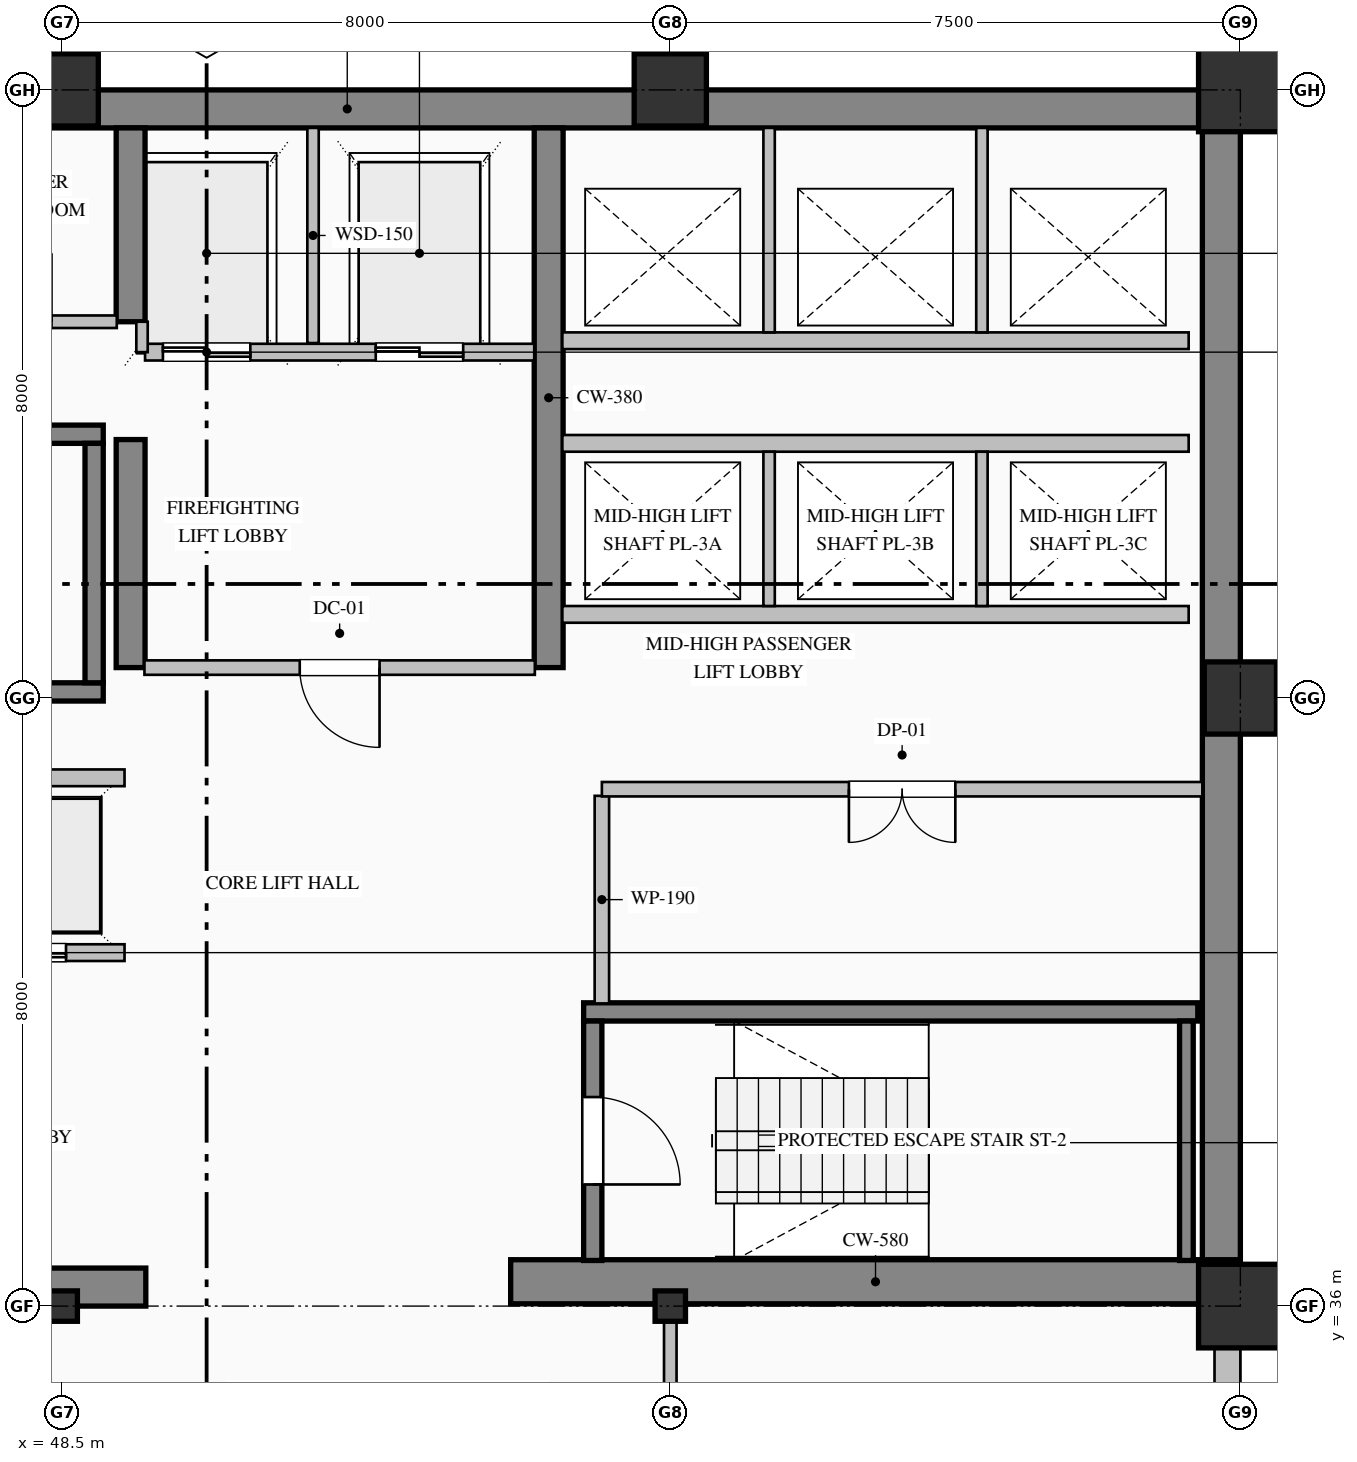
"""IFC4 building model, lengths in metres.
Left out: names, types, materials, properties, quantities, classifications, styles, units other than length and angle.
Written with IfcOpenShell. Run it as: python <this file> out.ifc"""

import sys

from ifc_helpers import new_model, si_unit, direction, frame, frame_2d, origin, origin_2d, place, context, subcontext, project, spatial, rectangle, hollow_rectangle, i_section, extrude, element, fill, save


model = new_model("IFC4")
c1 = context("Model", 3, precision=1e-05, world=origin(), true_north=direction((0.0, 1.0)))
c2 = subcontext(c1, "Body", "Model", "MODEL_VIEW")
j1 = project(units=[si_unit("LENGTHUNIT", "METRE"), si_unit("PLANEANGLEUNIT", "RADIAN")], contexts=[c1])
p1 = place(None, origin())
s1 = spatial("IfcSite", under=j1, at=p1, CompositionType="ELEMENT")
p2 = place(p1, origin())
s2 = spatial("IfcBuilding", under=s1, at=p2, CompositionType="ELEMENT")
p3 = place(p2, frame((0.0, 0.0, 187.0)))
s3 = spatial("IfcBuildingStorey", under=s2, at=p3, CompositionType="ELEMENT", Elevation=187.0)
p4 = place(p3, frame((40.5, 51.75, 0.0), z_axis=(0.0, 0.0, 1.0), x_axis=(1.0, 0.0, 0.0)))
e1 = element("IfcWall", 1, at=p4, inside=s3, PredefinedType="SHEAR", context=c2, shape_type="SweptSolid", body=[
    extrude(rectangle(XDim=23.5, YDim=0.5, at=frame_2d((11.75, 0.0))), origin(), (0.0, 0.0, 1.0), 3.765),
])
p5 = place(p3, frame((63.75, 36.32, 0.0), z_axis=(0.0, 0.0, 1.0), x_axis=(0.0, 1.0, 0.0)))
e2 = element("IfcWall", 2, at=p5, inside=s3, PredefinedType="SHEAR", context=c2, shape_type="SweptSolid", body=[
    extrude(rectangle(XDim=15.18, YDim=0.5, at=frame_2d((7.59, 0.0))), origin(), (0.0, 0.0, 1.0), 3.765),
])
p6 = place(p3, frame((40.5, 36.25, 0.0), z_axis=(0.0, 0.0, 1.0), x_axis=(1.0, 0.0, 0.0)))
e3 = element("IfcWall", 3, at=p6, inside=s3, PredefinedType="SHEAR", context=c2, shape_type="SweptSolid", body=[
    extrude(rectangle(XDim=9.1, YDim=0.5, at=frame_2d((4.55, 0.0))), origin(), (0.0, 0.0, 1.0), 3.765),
])
p7 = place(p3, frame((54.4, 36.32, 0.0), z_axis=(0.0, 0.0, 1.0), x_axis=(1.0, 0.0, 0.0)))
e4 = element("IfcWall", 4, at=p7, inside=s3, PredefinedType="SHEAR", context=c2, shape_type="SweptSolid", body=[
    extrude(rectangle(XDim=9.6, YDim=0.58, at=frame_2d((4.8, 0.0))), origin(), (0.0, 0.0, 1.0), 4.0),
])
p8 = place(p3, frame((49.4, 44.4, 0.0), z_axis=(0.0, 0.0, 1.0), x_axis=(0.0, 1.0, 0.0)))
e5 = element("IfcWall", 5, at=p8, inside=s3, PredefinedType="SHEAR", context=c2, shape_type="SweptSolid", body=[
    extrude(rectangle(XDim=3.0, YDim=0.38, at=frame_2d((1.5, 0.0))), origin(), (0.0, 0.0, 1.0), 3.765),
])
p9 = place(p3, frame((49.4, 48.95, 0.0), z_axis=(0.0, 0.0, 1.0), x_axis=(0.0, 1.0, 0.0)))
e6 = element("IfcWall", 6, at=p9, inside=s3, PredefinedType="SHEAR", context=c2, shape_type="SweptSolid", body=[
    extrude(rectangle(XDim=2.55, YDim=0.38, at=frame_2d((1.275, 0.0))), origin(), (0.0, 0.0, 1.0), 3.765),
])
p10 = place(p3, frame((54.9, 44.4, 0.0), z_axis=(0.0, 0.0, 1.0), x_axis=(0.0, 1.0, 0.0)))
e7 = element("IfcWall", 7, at=p10, inside=s3, PredefinedType="SHEAR", context=c2, shape_type="SweptSolid", body=[
    extrude(rectangle(XDim=7.1, YDim=0.38, at=frame_2d((3.55, 0.0))), origin(), (0.0, 0.0, 1.0), 3.765),
])
p11 = place(p3, frame((48.5, 36.0, 0.0), z_axis=(0.0, 0.0, 1.0), x_axis=(1.0, 0.0, 0.0)))
e8 = element("IfcColumn", 8, at=p11, inside=s3, PredefinedType="COLUMN", context=c2, shape_type="SweptSolid", body=[
    extrude(i_section(OverallWidth=0.4, OverallDepth=0.4, WebThickness=0.013, FlangeThickness=0.021, FilletRadius=0.022, at=origin_2d()), origin(), (0.0, 0.0, 1.0), 4.0),
])
p12 = place(p3, frame((48.5, 52.0, 0.0), z_axis=(0.0, 0.0, 1.0), x_axis=(1.0, 0.0, 0.0)))
e9 = element("IfcColumn", 9, at=p12, inside=s3, PredefinedType="COLUMN", context=c2, shape_type="SweptSolid", body=[
    extrude(hollow_rectangle(XDim=0.95, YDim=0.95, WallThickness=0.036, at=origin_2d()), origin(), (0.0, 0.0, 1.0), 4.0),
])
p13 = place(p3, frame((56.5, 36.0, 0.0), z_axis=(0.0, 0.0, 1.0), x_axis=(1.0, 0.0, 0.0)))
e10 = element("IfcColumn", 10, at=p13, inside=s3, PredefinedType="COLUMN", context=c2, shape_type="SweptSolid", body=[
    extrude(i_section(OverallWidth=0.4, OverallDepth=0.4, WebThickness=0.013, FlangeThickness=0.021, FilletRadius=0.022, at=origin_2d()), origin(), (0.0, 0.0, 1.0), 4.0),
])
p14 = place(p3, frame((56.5, 52.0, 0.0), z_axis=(0.0, 0.0, 1.0), x_axis=(1.0, 0.0, 0.0)))
e11 = element("IfcColumn", 11, at=p14, inside=s3, PredefinedType="COLUMN", context=c2, shape_type="SweptSolid", body=[
    extrude(hollow_rectangle(XDim=0.95, YDim=0.95, WallThickness=0.036, at=origin_2d()), origin(), (0.0, 0.0, 1.0), 4.0),
])
p15 = place(p3, frame((64.0, 36.0, 0.0), z_axis=(0.0, 0.0, 1.0), x_axis=(1.0, 0.0, 0.0)))
e12 = element("IfcColumn", 12, at=p15, inside=s3, PredefinedType="COLUMN", context=c2, shape_type="SweptSolid", body=[
    extrude(hollow_rectangle(XDim=1.1, YDim=1.1, WallThickness=0.04, at=origin_2d()), origin(), (0.0, 0.0, 1.0), 4.0),
])
p16 = place(p3, frame((64.0, 44.0, 0.0), z_axis=(0.0, 0.0, 1.0), x_axis=(1.0, 0.0, 0.0)))
e13 = element("IfcColumn", 13, at=p16, inside=s3, PredefinedType="COLUMN", context=c2, shape_type="SweptSolid", body=[
    extrude(hollow_rectangle(XDim=0.95, YDim=0.95, WallThickness=0.036, at=origin_2d()), origin(), (0.0, 0.0, 1.0), 4.0),
])
p17 = place(p3, frame((64.0, 52.0, 0.0), z_axis=(0.0, 0.0, 1.0), x_axis=(1.0, 0.0, 0.0)))
e14 = element("IfcColumn", 14, at=p17, inside=s3, PredefinedType="COLUMN", context=c2, shape_type="SweptSolid", body=[
    extrude(hollow_rectangle(XDim=1.1, YDim=1.1, WallThickness=0.04, at=origin_2d()), origin(), (0.0, 0.0, 1.0), 4.0),
])
p18 = place(p3, frame((63.83, 36.05, 0.0), z_axis=(0.0, 0.0, 1.0), x_axis=(0.0, -1.0, 0.0)))
e15 = element("IfcWall", 15, at=p18, inside=s3, PredefinedType="SOLIDWALL", context=c2, shape_type="SweptSolid", body=[
    extrude(rectangle(XDim=28.05, YDim=0.34, at=frame_2d((14.025, 0.0))), origin(), (0.0, 0.0, 1.0), 3.265),
])
p19 = place(p18, frame((2.85, 0.0, 0.85)))
e16 = element("IfcOpeningElement", 16, at=p19, cuts=e15, PredefinedType="OPENING", context=c2, shape_type="SweptSolid", body=[
    extrude(rectangle(XDim=1.5, YDim=1.95, at=frame_2d((0.75, 0.975))), frame((0.0, 0.18, 0.0), z_axis=(0.0, -1.0, 0.0), x_axis=(1.0, 0.0, 0.0)), (0.0, 0.0, 1.0), 0.36),
])
p20 = place(p18, frame((10.2, 0.0, 0.7)))
e17 = element("IfcOpeningElement", 17, at=p20, cuts=e15, PredefinedType="OPENING", context=c2, shape_type="SweptSolid", body=[
    extrude(rectangle(XDim=1.2, YDim=1.85, at=frame_2d((0.6, 0.925))), frame((0.0, 0.18, 0.0), z_axis=(0.0, -1.0, 0.0), x_axis=(1.0, 0.0, 0.0)), (0.0, 0.0, 1.0), 0.36),
])
p21 = place(p18, frame((24.45, 0.0, 0.85)))
e18 = element("IfcOpeningElement", 18, at=p21, cuts=e15, PredefinedType="OPENING", context=c2, shape_type="SweptSolid", body=[
    extrude(rectangle(XDim=1.5, YDim=1.95, at=frame_2d((0.75, 0.975))), frame((0.0, 0.18, 0.0), z_axis=(0.0, -1.0, 0.0), x_axis=(1.0, 0.0, 0.0)), (0.0, 0.0, 1.0), 0.36),
])
for number, where, z_axis, x_axis in (
    (19, (40.96, 47.47, 0.0), (0.0, 0.0, 1.0), (1.0, 0.0, 0.0)),
    (20, (49.04, 44.08, 0.0), (0.0, 0.0, 1.0), (-1.0, 0.0, 0.0)),
):
    element("IfcWall", number, at=place(p3, frame(where, z_axis=z_axis, x_axis=x_axis)), inside=s3, PredefinedType="SOLIDWALL", context=c2, shape_type="SweptSolid", body=[
        extrude(rectangle(XDim=8.08, YDim=0.24, at=frame_2d((4.04, 0.0))), origin(), (0.0, 0.0, 1.0), 4.0),
    ])
p22 = place(p3, frame((48.92, 44.2, 0.0), z_axis=(0.0, 0.0, 1.0), x_axis=(0.0, 1.0, 0.0)))
e21 = element("IfcWall", 21, at=p22, inside=s3, PredefinedType="SOLIDWALL", context=c2, shape_type="SweptSolid", body=[
    extrude(rectangle(XDim=3.15, YDim=0.24, at=frame_2d((1.575, 0.0))), origin(), (0.0, 0.0, 1.0), 4.0),
])
p23 = place(p3, frame((55.36, 39.87, 0.0), z_axis=(0.0, 0.0, 1.0), x_axis=(1.0, 0.0, 0.0)))
e22 = element("IfcWall", 22, at=p23, inside=s3, PredefinedType="SOLIDWALL", context=c2, shape_type="SweptSolid", body=[
    extrude(rectangle(XDim=8.08, YDim=0.24, at=frame_2d((4.04, 0.0))), origin(), (0.0, 0.0, 1.0), 4.0),
])
p24 = place(p3, frame((55.48, 39.75, 0.0), z_axis=(0.0, 0.0, 1.0), x_axis=(0.0, -1.0, 0.0)))
e23 = element("IfcWall", 23, at=p24, inside=s3, PredefinedType="SOLIDWALL", context=c2, shape_type="SweptSolid", body=[
    extrude(rectangle(XDim=3.15, YDim=0.24, at=frame_2d((1.575, 0.0))), origin(), (0.0, 0.0, 1.0), 4.0),
])
p25 = place(p24, frame((1.0, 0.0, 0.0)))
e24 = element("IfcOpeningElement", 24, at=p25, cuts=e23, PredefinedType="OPENING", context=c2, shape_type="SweptSolid", body=[
    extrude(rectangle(XDim=1.15, YDim=2.2, at=frame_2d((0.575, 1.1))), frame((0.0, 0.13, 0.0), z_axis=(0.0, -1.0, 0.0), x_axis=(1.0, 0.0, 0.0)), (0.0, 0.0, 1.0), 0.26),
])
p26 = place(p3, frame((63.29, 36.6, 0.0), z_axis=(0.0, 0.0, 1.0), x_axis=(0.0, 1.0, 0.0)))
e25 = element("IfcWall", 25, at=p26, inside=s3, PredefinedType="SOLIDWALL", context=c2, shape_type="SweptSolid", body=[
    extrude(rectangle(XDim=3.15, YDim=0.18, at=frame_2d((1.575, 0.0))), origin(), (0.0, 0.0, 1.0), 4.0),
])
p27 = place(p3, frame((54.71, 48.55, 0.0), z_axis=(0.0, 0.0, 1.0), x_axis=(-1.0, 0.0, 0.0)))
e26 = element("IfcWall", 26, at=p27, inside=s3, PredefinedType="PARTITIONING", context=c2, shape_type="SweptSolid", body=[
    extrude(rectangle(XDim=5.12, YDim=0.22, at=frame_2d((2.56, 0.0))), origin(), (0.0, 0.0, 1.0), 3.765),
])
p28 = place(p27, frame((3.735, 0.0, 0.0)))
e27 = element("IfcOpeningElement", 27, at=p28, cuts=e26, PredefinedType="OPENING", context=c2, shape_type="SweptSolid", body=[
    extrude(rectangle(XDim=1.15, YDim=2.2, at=frame_2d((0.575, 1.1))), frame((0.0, 0.12, 0.0), z_axis=(0.0, -1.0, 0.0), x_axis=(1.0, 0.0, 0.0)), (0.0, 0.0, 1.0), 0.24),
])
p29 = place(p27, frame((0.935, 0.0, 0.0)))
e28 = element("IfcOpeningElement", 28, at=p29, cuts=e26, PredefinedType="OPENING", context=c2, shape_type="SweptSolid", body=[
    extrude(rectangle(XDim=1.15, YDim=2.2, at=frame_2d((0.575, 1.1))), frame((0.0, 0.12, 0.0), z_axis=(0.0, -1.0, 0.0), x_axis=(1.0, 0.0, 0.0)), (0.0, 0.0, 1.0), 0.24),
])
p30 = place(p3, frame((51.8, 48.67, 0.0), z_axis=(0.0, 0.0, 1.0), x_axis=(0.0, 1.0, 0.0)))
e29 = element("IfcWall", 29, at=p30, inside=s3, PredefinedType="PARTITIONING", context=c2, shape_type="SweptSolid", body=[
    extrude(rectangle(XDim=2.83, YDim=0.15, at=frame_2d((1.415, 0.0))), origin(), (0.0, 0.0, 1.0), 3.765),
])
p31 = place(p3, frame((49.55, 48.55, 0.0), z_axis=(0.0, 0.0, 1.0), x_axis=(0.0, 1.0, 0.0)))
e30 = element("IfcWall", 30, at=p31, inside=s3, PredefinedType="PARTITIONING", context=c2, shape_type="SweptSolid", body=[
    extrude(rectangle(XDim=0.4, YDim=0.15, at=frame_2d((0.2, 0.0))), origin(), (0.0, 0.0, 1.0), 3.765),
])
p32 = place(p3, frame((49.32, 40.65, 0.0), z_axis=(0.0, 0.0, 1.0), x_axis=(-1.0, 0.0, 0.0)))
e31 = element("IfcWall", 31, at=p32, inside=s3, PredefinedType="PARTITIONING", context=c2, shape_type="SweptSolid", body=[
    extrude(rectangle(XDim=8.24, YDim=0.22, at=frame_2d((4.12, 0.0))), origin(), (0.0, 0.0, 1.0), 3.765),
])
p33 = place(p32, frame((6.37, 0.0, 0.0)))
e32 = element("IfcOpeningElement", 32, at=p33, cuts=e31, PredefinedType="OPENING", context=c2, shape_type="SweptSolid", body=[
    extrude(rectangle(XDim=1.1, YDim=2.2, at=frame_2d((0.55, 1.1))), frame((0.0, 0.12, 0.0), z_axis=(0.0, -1.0, 0.0), x_axis=(1.0, 0.0, 0.0)), (0.0, 0.0, 1.0), 0.24),
])
p34 = place(p32, frame((3.57, 0.0, 0.0)))
e33 = element("IfcOpeningElement", 33, at=p34, cuts=e31, PredefinedType="OPENING", context=c2, shape_type="SweptSolid", body=[
    extrude(rectangle(XDim=1.1, YDim=2.2, at=frame_2d((0.55, 1.1))), frame((0.0, 0.12, 0.0), z_axis=(0.0, -1.0, 0.0), x_axis=(1.0, 0.0, 0.0)), (0.0, 0.0, 1.0), 0.24),
])
p35 = place(p32, frame((0.77, 0.0, 0.0)))
e34 = element("IfcOpeningElement", 34, at=p35, cuts=e31, PredefinedType="OPENING", context=c2, shape_type="SweptSolid", body=[
    extrude(rectangle(XDim=1.1, YDim=2.2, at=frame_2d((0.55, 1.1))), frame((0.0, 0.12, 0.0), z_axis=(0.0, -1.0, 0.0), x_axis=(1.0, 0.0, 0.0)), (0.0, 0.0, 1.0), 0.24),
])
for number, where, z_axis, x_axis in (
    (35, (41.08, 42.95, 0.0), (0.0, 0.0, 1.0), (1.0, 0.0, 0.0)),
    (36, (63.32, 45.1, 0.0), (0.0, 0.0, 1.0), (-1.0, 0.0, 0.0)),
    (37, (55.08, 47.35, 0.0), (0.0, 0.0, 1.0), (1.0, 0.0, 0.0)),
):
    element("IfcWall", number, at=place(p3, frame(where, z_axis=z_axis, x_axis=x_axis)), inside=s3, PredefinedType="PARTITIONING", context=c2, shape_type="SweptSolid", body=[
        extrude(rectangle(XDim=8.24, YDim=0.22, at=frame_2d((4.12, 0.0))), origin(), (0.0, 0.0, 1.0), 3.765),
    ])
for number, where, z_axis, x_axis in (
    (38, (57.8, 45.21, 0.0), (0.0, 0.0, 1.0), (0.0, 1.0, 0.0)),
    (39, (60.6, 45.21, 0.0), (0.0, 0.0, 1.0), (0.0, 1.0, 0.0)),
):
    element("IfcWall", number, at=place(p3, frame(where, z_axis=z_axis, x_axis=x_axis)), inside=s3, PredefinedType="PARTITIONING", context=c2, shape_type="SweptSolid", body=[
        extrude(rectangle(XDim=2.03, YDim=0.15, at=frame_2d((1.015, 0.0))), origin(), (0.0, 0.0, 1.0), 3.765),
    ])
p36 = place(p3, frame((63.32, 48.7, 0.0), z_axis=(0.0, 0.0, 1.0), x_axis=(-1.0, 0.0, 0.0)))
e40 = element("IfcWall", 40, at=p36, inside=s3, PredefinedType="PARTITIONING", context=c2, shape_type="SweptSolid", body=[
    extrude(rectangle(XDim=8.24, YDim=0.22, at=frame_2d((4.12, 0.0))), origin(), (0.0, 0.0, 1.0), 3.765),
])
for number, where, z_axis, x_axis in (
    (41, (57.8, 48.81, 0.0), (0.0, 0.0, 1.0), (0.0, 1.0, 0.0)),
    (42, (60.6, 48.81, 0.0), (0.0, 0.0, 1.0), (0.0, 1.0, 0.0)),
):
    element("IfcWall", number, at=place(p3, frame(where, z_axis=z_axis, x_axis=x_axis)), inside=s3, PredefinedType="PARTITIONING", context=c2, shape_type="SweptSolid", body=[
        extrude(rectangle(XDim=2.69, YDim=0.15, at=frame_2d((1.345, 0.0))), origin(), (0.0, 0.0, 1.0), 3.765),
    ])
p37 = place(p3, frame((46.6, 48.95, 0.0), z_axis=(0.0, 0.0, 1.0), x_axis=(1.0, 0.0, 0.0)))
e43 = element("IfcWall", 43, at=p37, inside=s3, PredefinedType="PARTITIONING", context=c2, shape_type="SweptSolid", body=[
    extrude(rectangle(XDim=2.618, YDim=0.165, at=frame_2d((1.309, 0.0))), origin(), (0.0, 0.0, 1.0), 3.765),
])
p38 = place(p37, frame((0.859, 0.0, 0.0)))
e44 = element("IfcOpeningElement", 44, at=p38, cuts=e43, PredefinedType="OPENING", context=c2, shape_type="SweptSolid", body=[
    extrude(rectangle(XDim=0.9, YDim=2.15, at=frame_2d((0.45, 1.075))), frame((0.0, 0.093, 0.0), z_axis=(0.0, -1.0, 0.0), x_axis=(1.0, 0.0, 0.0)), (0.0, 0.0, 1.0), 0.185),
])
p39 = place(p3, frame((54.718, 44.4, 0.0), z_axis=(0.0, 0.0, 1.0), x_axis=(-1.0, 0.0, 0.0)))
e45 = element("IfcWall", 45, at=p39, inside=s3, PredefinedType="PARTITIONING", context=c2, shape_type="SweptSolid", body=[
    extrude(rectangle(XDim=5.136, YDim=0.19, at=frame_2d((2.568, 0.0))), origin(), (0.0, 0.0, 1.0), 3.765),
])
p40 = place(p39, frame((2.043, 0.0, 0.0)))
e46 = element("IfcOpeningElement", 46, at=p40, cuts=e45, PredefinedType="OPENING", context=c2, shape_type="SweptSolid", body=[
    extrude(rectangle(XDim=1.05, YDim=2.15, at=frame_2d((0.525, 1.075))), frame((0.0, 0.105, 0.0), z_axis=(0.0, -1.0, 0.0), x_axis=(1.0, 0.0, 0.0)), (0.0, 0.0, 1.0), 0.21),
])
p41 = place(p3, frame((55.6, 42.713, 0.0), z_axis=(0.0, 0.0, 1.0), x_axis=(0.0, -1.0, 0.0)))
e47 = element("IfcWall", 47, at=p41, inside=s3, PredefinedType="PARTITIONING", context=c2, shape_type="SweptSolid", body=[
    extrude(rectangle(XDim=2.731, YDim=0.19, at=frame_2d((1.365, 0.0))), origin(), (0.0, 0.0, 1.0), 3.765),
])
p42 = place(p3, frame((63.5, 42.8, 0.0), z_axis=(0.0, 0.0, 1.0), x_axis=(-1.0, 0.0, 0.0)))
e48 = element("IfcWall", 48, at=p42, inside=s3, PredefinedType="PARTITIONING", context=c2, shape_type="SweptSolid", body=[
    extrude(rectangle(XDim=7.9, YDim=0.19, at=frame_2d((3.95, 0.0))), origin(), (0.0, 0.0, 1.0), 3.765),
])
p43 = place(p42, frame((3.25, 0.0, 0.0)))
e49 = element("IfcOpeningElement", 49, at=p43, cuts=e48, PredefinedType="OPENING", context=c2, shape_type="SweptSolid", body=[
    extrude(rectangle(XDim=1.4, YDim=2.25, at=frame_2d((0.7, 1.125))), frame((0.0, 0.105, 0.0), z_axis=(0.0, -1.0, 0.0), x_axis=(1.0, 0.0, 0.0)), (0.0, 0.0, 1.0), 0.21),
])
p44 = place(p3, frame((56.5, 36.0, 0.0), z_axis=(0.0, 0.0, 1.0), x_axis=(0.0, -1.0, 0.0)))
e50 = element("IfcWall", 50, at=p44, inside=s3, PredefinedType="PARTITIONING", context=c2, shape_type="SweptSolid", body=[
    extrude(rectangle(XDim=2.325, YDim=0.165, at=frame_2d((1.163, 0.0))), origin(), (0.0, 0.0, 1.0), 3.157),
])
p45 = place(p25, origin())
e51 = element("IfcDoor", 51, at=p45, inside=s3, OperationType="SINGLE_SWING_RIGHT", PredefinedType="DOOR", context=c2, shape_type="SweptSolid", body=[
    extrude(rectangle(XDim=1.15, YDim=2.2, at=frame_2d((0.575, 1.1))), frame((0.0, 0.025, 0.0), z_axis=(0.0, -1.0, 0.0), x_axis=(1.0, 0.0, 0.0)), (0.0, 0.0, 1.0), 0.05),
])
fill(e24, e51)
p46 = place(p28, origin())
e52 = element("IfcDoor", 52, at=p46, inside=s3, OperationType="DOUBLE_DOOR_SLIDING", PredefinedType="DOOR", context=c2, shape_type="SweptSolid", body=[
    extrude(rectangle(XDim=1.15, YDim=2.2, at=frame_2d((0.575, 1.1))), frame((0.0, 0.025, 0.0), z_axis=(0.0, -1.0, 0.0), x_axis=(1.0, 0.0, 0.0)), (0.0, 0.0, 1.0), 0.05),
])
fill(e27, e52)
p47 = place(p29, origin())
e53 = element("IfcDoor", 53, at=p47, inside=s3, OperationType="DOUBLE_DOOR_SLIDING", PredefinedType="DOOR", context=c2, shape_type="SweptSolid", body=[
    extrude(rectangle(XDim=1.15, YDim=2.2, at=frame_2d((0.575, 1.1))), frame((0.0, 0.025, 0.0), z_axis=(0.0, -1.0, 0.0), x_axis=(1.0, 0.0, 0.0)), (0.0, 0.0, 1.0), 0.05),
])
fill(e28, e53)
p48 = place(p35, origin())
e54 = element("IfcDoor", 54, at=p48, inside=s3, OperationType="DOUBLE_DOOR_SLIDING", PredefinedType="DOOR", context=c2, shape_type="SweptSolid", body=[
    extrude(rectangle(XDim=1.1, YDim=2.2, at=frame_2d((0.55, 1.1))), frame((0.0, 0.025, 0.0), z_axis=(0.0, -1.0, 0.0), x_axis=(1.0, 0.0, 0.0)), (0.0, 0.0, 1.0), 0.05),
])
fill(e34, e54)
p49 = place(p40, origin())
e55 = element("IfcDoor", 55, at=p49, inside=s3, OperationType="SINGLE_SWING_LEFT", PredefinedType="DOOR", context=c2, shape_type="SweptSolid", body=[
    extrude(rectangle(XDim=1.05, YDim=2.15, at=frame_2d((0.525, 1.075))), frame((0.0, 0.025, 0.0), z_axis=(0.0, -1.0, 0.0), x_axis=(1.0, 0.0, 0.0)), (0.0, 0.0, 1.0), 0.05),
])
fill(e46, e55)
p50 = place(p43, origin())
e56 = element("IfcDoor", 56, at=p50, inside=s3, OperationType="DOUBLE_DOOR_SINGLE_SWING", PredefinedType="DOOR", context=c2, shape_type="SweptSolid", body=[
    extrude(rectangle(XDim=1.4, YDim=2.25, at=frame_2d((0.7, 1.125))), frame((0.0, 0.025, 0.0), z_axis=(0.0, -1.0, 0.0), x_axis=(1.0, 0.0, 0.0)), (0.0, 0.0, 1.0), 0.05),
])
fill(e49, e56)
save(model, sys.argv[1])
